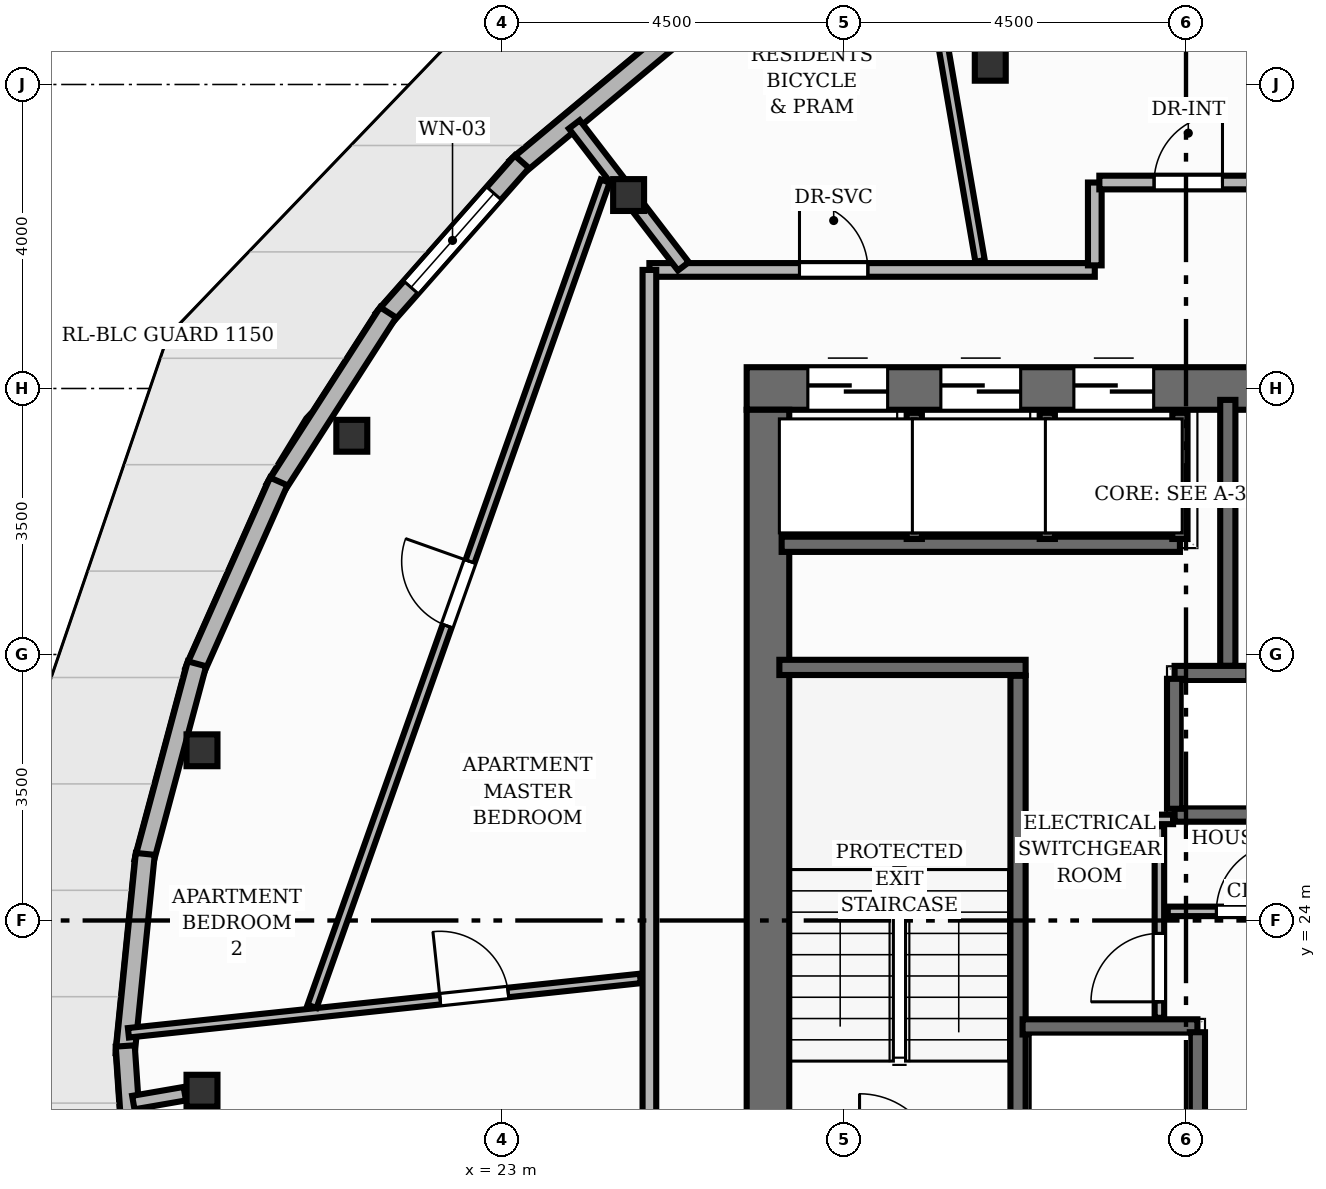
"""IFC4 building model, lengths in metres.
Left out: names, types, materials, properties, quantities, classifications, styles, units other than length and angle.
Written with IfcOpenShell. Run it as: python <this file> out.ifc"""

import sys

from ifc_helpers import new_model, si_unit, direction, frame, frame_2d, origin, origin_2d, place, context, subcontext, project, spatial, rectangle, i_section, extrude, element, fill, save


model = new_model("IFC4")
c1 = context("Model", 3, precision=1e-05, world=origin(), true_north=direction((0.0, 1.0)))
c2 = subcontext(c1, "Body", "Model", "MODEL_VIEW")
j1 = project(units=[si_unit("LENGTHUNIT", "METRE"), si_unit("PLANEANGLEUNIT", "RADIAN")], contexts=[c1])
p1 = place(None, origin())
s1 = spatial("IfcSite", under=j1, at=p1, CompositionType="ELEMENT")
p2 = place(p1, origin())
s2 = spatial("IfcBuilding", under=s1, at=p2, CompositionType="ELEMENT")
p3 = place(p2, frame((0.0, 0.0, 211.04)))
s3 = spatial("IfcBuildingStorey", under=s2, at=p3, CompositionType="ELEMENT", Elevation=211.04)
p4 = place(p3, frame((26.22, 31.0, 0.0), z_axis=(0.0, 0.0, 1.0), x_axis=(1.0, 0.0, 0.0)))
e1 = element("IfcWall", 1, at=p4, inside=s3, PredefinedType="SHEAR", context=c2, shape_type="SweptSolid", body=[
    extrude(rectangle(XDim=11.56, YDim=0.56, at=frame_2d((5.78, 0.0))), origin(), (0.0, 0.0, 1.0), 3.2),
])
p5 = place(p4, frame((8.18, 0.0, 0.0)))
e2 = element("IfcOpeningElement", 2, at=p5, cuts=e1, PredefinedType="OPENING", context=c2, shape_type="SweptSolid", body=[
    extrude(rectangle(XDim=1.1, YDim=2.15, at=frame_2d((0.55, 1.075))), frame((0.0, 0.29, 0.0), z_axis=(0.0, -1.0, 0.0), x_axis=(1.0, 0.0, 0.0)), (0.0, 0.0, 1.0), 0.58),
])
p6 = place(p4, frame((0.805, 0.0, 0.0)))
e3 = element("IfcOpeningElement", 3, at=p6, cuts=e1, PredefinedType="OPENING", context=c2, shape_type="SweptSolid", body=[
    extrude(rectangle(XDim=1.05, YDim=2.15, at=frame_2d((0.525, 1.075))), frame((0.0, 0.29, 0.0), z_axis=(0.0, -1.0, 0.0), x_axis=(1.0, 0.0, 0.0)), (0.0, 0.0, 1.0), 0.58),
])
p7 = place(p4, frame((2.555, 0.0, 0.0)))
e4 = element("IfcOpeningElement", 4, at=p7, cuts=e1, PredefinedType="OPENING", context=c2, shape_type="SweptSolid", body=[
    extrude(rectangle(XDim=1.05, YDim=2.15, at=frame_2d((0.525, 1.075))), frame((0.0, 0.29, 0.0), z_axis=(0.0, -1.0, 0.0), x_axis=(1.0, 0.0, 0.0)), (0.0, 0.0, 1.0), 0.58),
])
p8 = place(p4, frame((4.305, 0.0, 0.0)))
e5 = element("IfcOpeningElement", 5, at=p8, cuts=e1, PredefinedType="OPENING", context=c2, shape_type="SweptSolid", body=[
    extrude(rectangle(XDim=1.05, YDim=2.15, at=frame_2d((0.525, 1.075))), frame((0.0, 0.29, 0.0), z_axis=(0.0, -1.0, 0.0), x_axis=(1.0, 0.0, 0.0)), (0.0, 0.0, 1.0), 0.58),
])
p9 = place(p3, frame((26.5, 17.28, 0.0), z_axis=(0.0, 0.0, 1.0), x_axis=(0.0, 1.0, 0.0)))
e6 = element("IfcWall", 6, at=p9, inside=s3, PredefinedType="SHEAR", context=c2, shape_type="SweptSolid", body=[
    extrude(rectangle(XDim=13.44, YDim=0.56, at=frame_2d((6.72, 0.0))), origin(), (0.0, 0.0, 1.0), 3.2),
])
for number, where, z_axis, x_axis in (
    (7, (29.425, 35.26, 0.0), (0.0, 0.0, 1.0), (1.0, 0.0, 0.0)),
    (8, (24.667, 33.545, 0.0), (0.0, 0.0, 1.0), (1.0, 0.0, 0.0)),
    (9, (21.025, 30.378, 0.0), (0.0, 0.0, 1.0), (1.0, 0.0, 0.0)),
    (10, (19.054, 26.24, 0.0), (0.0, 0.0, 1.0), (1.0, 0.0, 0.0)),
    (11, (19.054, 21.76, 0.0), (0.0, 0.0, 1.0), (1.0, 0.0, 0.0)),
):
    element("IfcColumn", number, at=place(p3, frame(where, z_axis=z_axis, x_axis=x_axis)), inside=s3, PredefinedType="COLUMN", context=c2, shape_type="SweptSolid", body=[
        extrude(i_section(OverallWidth=0.407, OverallDepth=0.419, WebThickness=0.031, FlangeThickness=0.049, at=origin_2d()), origin(), (0.0, 0.0, 1.0), 3.2),
    ])
p10 = place(p3, frame((23.184, 33.906, 0.0), z_axis=(0.0, 0.0, 1.0), x_axis=(0.76821397209, 0.640193168571, 0.0)))
e12 = element("IfcWall", 12, at=p10, inside=s3, PredefinedType="SOLIDWALL", context=c2, shape_type="SweptSolid", body=[
    extrude(rectangle(XDim=2.739, YDim=0.25, at=frame_2d((1.369, 0.0))), origin(), (0.0, 0.0, 1.0), 2.96),
])
p11 = place(p3, frame((21.437, 31.915, 0.0), z_axis=(0.0, 0.0, 1.0), x_axis=(0.661694827408, 0.749773269317, 0.0)))
e13 = element("IfcWall", 13, at=p11, inside=s3, PredefinedType="SOLIDWALL", context=c2, shape_type="SweptSolid", body=[
    extrude(rectangle(XDim=2.758, YDim=0.25, at=frame_2d((1.379, 0.0))), origin(), (0.0, 0.0, 1.0), 2.96),
])
p12 = place(p11, frame((0.554, 0.0, 0.85)))
e14 = element("IfcOpeningElement", 14, at=p12, cuts=e13, PredefinedType="OPENING", context=c2, shape_type="SweptSolid", body=[
    extrude(rectangle(XDim=1.65, YDim=1.55, at=frame_2d((0.825, 0.775))), frame((0.0, 0.135, 0.0), z_axis=(0.0, -1.0, 0.0), x_axis=(1.0, 0.0, 0.0)), (0.0, 0.0, 1.0), 0.27),
])
p13 = place(p3, frame((20.012, 29.681, 0.0), z_axis=(0.0, 0.0, 1.0), x_axis=(0.540690479286, 0.841221615039, 0.0)))
e15 = element("IfcWall", 15, at=p13, inside=s3, PredefinedType="SOLIDWALL", context=c2, shape_type="SweptSolid", body=[
    extrude(rectangle(XDim=2.758, YDim=0.25, at=frame_2d((1.379, 0.0))), origin(), (0.0, 0.0, 1.0), 2.96),
])
p14 = place(p3, frame((18.951, 27.274, 0.0), z_axis=(0.0, 0.0, 1.0), x_axis=(0.40624599189, 0.913763751783, 0.0)))
e16 = element("IfcWall", 16, at=p14, inside=s3, PredefinedType="SOLIDWALL", context=c2, shape_type="SweptSolid", body=[
    extrude(rectangle(XDim=2.739, YDim=0.25, at=frame_2d((1.369, 0.0))), origin(), (0.0, 0.0, 1.0), 2.96),
])
p15 = place(p3, frame((18.288, 24.768, 0.0), z_axis=(0.0, 0.0, 1.0), x_axis=(0.259023691836, 0.965870968126, 0.0)))
e17 = element("IfcWall", 17, at=p15, inside=s3, PredefinedType="SOLIDWALL", context=c2, shape_type="SweptSolid", body=[
    extrude(rectangle(XDim=2.701, YDim=0.25, at=frame_2d((1.351, 0.0))), origin(), (0.0, 0.0, 1.0), 2.577),
])
p16 = place(p3, frame((18.042, 22.239, 0.0), z_axis=(0.0, 0.0, 1.0), x_axis=(0.100196668354, 0.99496765156, 0.0)))
e18 = element("IfcWall", 18, at=p16, inside=s3, PredefinedType="SOLIDWALL", context=c2, shape_type="SweptSolid", body=[
    extrude(rectangle(XDim=2.651, YDim=0.25, at=frame_2d((1.326, 0.0))), origin(), (0.0, 0.0, 1.0), 2.96),
])
p17 = place(p3, frame((18.221, 19.763, 0.0), z_axis=(0.0, 0.0, 1.0), x_axis=(-0.068469168344, 0.997653232835, 0.0)))
e19 = element("IfcWall", 19, at=p17, inside=s3, PredefinedType="SOLIDWALL", context=c2, shape_type="SweptSolid", body=[
    extrude(rectangle(XDim=2.592, YDim=0.25, at=frame_2d((1.296, 0.0))), origin(), (0.0, 0.0, 1.0), 2.96),
])
p18 = place(p3, frame((29.79, 20.78, 0.0), z_axis=(0.0, 0.0, 1.0), x_axis=(0.0, 1.0, 0.0)))
e20 = element("IfcWall", 20, at=p18, inside=s3, PredefinedType="SHEAR", context=c2, shape_type="SweptSolid", body=[
    extrude(rectangle(XDim=6.44, YDim=0.2, at=frame_2d((3.22, 0.0))), origin(), (0.0, 0.0, 1.0), 3.2),
])
p19 = place(p3, frame((26.65, 27.33, 0.0), z_axis=(0.0, 0.0, 1.0), x_axis=(1.0, 0.0, 0.0)))
e21 = element("IfcWall", 21, at=p19, inside=s3, PredefinedType="SHEAR", context=c2, shape_type="SweptSolid", body=[
    extrude(rectangle(XDim=3.24, YDim=0.2, at=frame_2d((1.62, 0.0))), origin(), (0.0, 0.0, 1.0), 3.2),
])
p20 = place(p3, frame((32.55, 27.35, 0.0), z_axis=(0.0, 0.0, 1.0), x_axis=(0.0, 1.0, 0.0)))
e22 = element("IfcWall", 22, at=p20, inside=s3, PredefinedType="SHEAR", context=c2, shape_type="SweptSolid", body=[
    extrude(rectangle(XDim=3.5, YDim=0.2, at=frame_2d((1.75, 0.0))), origin(), (0.0, 0.0, 1.0), 3.2),
])
p21 = place(p3, frame((29.85, 22.6, 0.0), z_axis=(0.0, 0.0, 1.0), x_axis=(1.0, 0.0, 0.0)))
e23 = element("IfcWall", 23, at=p21, inside=s3, PredefinedType="SHEAR", context=c2, shape_type="SweptSolid", body=[
    extrude(rectangle(XDim=2.3, YDim=0.2, at=frame_2d((1.15, 0.0))), origin(), (0.0, 0.0, 1.0), 3.2),
])
p22 = place(p3, frame((32.15, 20.82, 0.0), z_axis=(0.0, 0.0, 1.0), x_axis=(0.0, 1.0, 0.0)))
e24 = element("IfcWall", 24, at=p22, inside=s3, PredefinedType="SHEAR", context=c2, shape_type="SweptSolid", body=[
    extrude(rectangle(XDim=1.71, YDim=0.2, at=frame_2d((0.855, 0.0))), origin(), (0.0, 0.0, 1.0), 3.2),
])
p23 = place(p3, frame((31.85, 27.25, 0.0), z_axis=(0.0, 0.0, 1.0), x_axis=(1.0, 0.0, 0.0)))
e25 = element("IfcWall", 25, at=p23, inside=s3, PredefinedType="SHEAR", context=c2, shape_type="SweptSolid", body=[
    extrude(rectangle(XDim=2.3, YDim=0.2, at=frame_2d((1.15, 0.0))), origin(), (0.0, 0.0, 1.0), 3.2),
])
p24 = place(p23, frame((0.95, 0.0, 0.0)))
e26 = element("IfcOpeningElement", 26, at=p24, cuts=e25, PredefinedType="OPENING", context=c2, shape_type="SweptSolid", body=[
    extrude(rectangle(XDim=1.1, YDim=2.15, at=frame_2d((0.55, 1.075))), frame((0.0, 0.11, 0.0), z_axis=(0.0, -1.0, 0.0), x_axis=(1.0, 0.0, 0.0)), (0.0, 0.0, 1.0), 0.22),
])
p25 = place(p3, frame((31.85, 25.4, 0.0), z_axis=(0.0, 0.0, 1.0), x_axis=(1.0, 0.0, 0.0)))
e27 = element("IfcWall", 27, at=p25, inside=s3, PredefinedType="SHEAR", context=c2, shape_type="SweptSolid", body=[
    extrude(rectangle(XDim=2.3, YDim=0.2, at=frame_2d((1.15, 0.0))), origin(), (0.0, 0.0, 1.0), 3.2),
])
p26 = place(p3, frame((31.85, 25.47, 0.0), z_axis=(0.0, 0.0, 1.0), x_axis=(0.0, 1.0, 0.0)))
e28 = element("IfcWall", 28, at=p26, inside=s3, PredefinedType="SHEAR", context=c2, shape_type="SweptSolid", body=[
    extrude(rectangle(XDim=1.71, YDim=0.2, at=frame_2d((0.855, 0.0))), origin(), (0.0, 0.0, 1.0), 3.2),
])
p27 = place(p3, frame((26.68, 28.95, 0.0), z_axis=(0.0, 0.0, 1.0), x_axis=(1.0, 0.0, 0.0)))
e29 = element("IfcWall", 29, at=p27, inside=s3, PredefinedType="SHEAR", context=c2, shape_type="SweptSolid", body=[
    extrude(rectangle(XDim=5.24, YDim=0.2, at=frame_2d((2.62, 0.0))), origin(), (0.0, 0.0, 1.0), 3.2),
])
for number, where, z_axis, x_axis in (
    (30, (31.92, 29.02, 0.0), (0.0, 0.0, 1.0), (0.0, 1.0, 0.0)),
    (31, (28.425, 29.02, 0.0), (0.0, 0.0, 1.0), (0.0, 1.0, 0.0)),
    (32, (30.175, 29.02, 0.0), (0.0, 0.0, 1.0), (0.0, 1.0, 0.0)),
):
    element("IfcWall", number, at=place(p3, frame(where, z_axis=z_axis, x_axis=x_axis)), inside=s3, PredefinedType="SHEAR", context=c2, shape_type="SweptSolid", body=[
        extrude(rectangle(XDim=1.66, YDim=0.2, at=frame_2d((0.83, 0.0))), origin(), (0.0, 0.0, 1.0), 3.2),
    ])
p28 = place(p3, frame((31.65, 22.72, 0.0), z_axis=(0.0, 0.0, 1.0), x_axis=(0.0, 1.0, 0.0)))
e33 = element("IfcWall", 33, at=p28, inside=s3, PredefinedType="PARTITIONING", context=c2, shape_type="SweptSolid", body=[
    extrude(rectangle(XDim=2.52, YDim=0.125, at=frame_2d((1.26, 0.0))), origin(), (0.0, 0.0, 1.0), 2.955),
])
p29 = place(p28, frame((0.21, 0.0, 0.0)))
e34 = element("IfcOpeningElement", 34, at=p29, cuts=e33, PredefinedType="OPENING", context=c2, shape_type="SweptSolid", body=[
    extrude(rectangle(XDim=0.9, YDim=2.1, at=frame_2d((0.45, 1.05))), frame((0.0, 0.073, 0.0), z_axis=(0.0, -1.0, 0.0), x_axis=(1.0, 0.0, 0.0)), (0.0, 0.0, 1.0), 0.145),
])
p30 = place(p3, frame((31.76, 24.12, 0.0), z_axis=(0.0, 0.0, 1.0), x_axis=(1.0, 0.0, 0.0)))
e35 = element("IfcWall", 35, at=p30, inside=s3, PredefinedType="PARTITIONING", context=c2, shape_type="SweptSolid", body=[
    extrude(rectangle(XDim=2.32, YDim=0.125, at=frame_2d((1.16, 0.0))), origin(), (0.0, 0.0, 1.0), 2.955),
])
p31 = place(p30, frame((0.64, 0.0, 0.0)))
e36 = element("IfcOpeningElement", 36, at=p31, cuts=e35, PredefinedType="OPENING", context=c2, shape_type="SweptSolid", body=[
    extrude(rectangle(XDim=0.9, YDim=2.1, at=frame_2d((0.45, 1.05))), frame((0.0, 0.073, 0.0), z_axis=(0.0, -1.0, 0.0), x_axis=(1.0, 0.0, 0.0)), (0.0, 0.0, 1.0), 0.145),
])
p32 = place(p3, frame((29.89, 25.33, 0.0), z_axis=(0.0, 0.0, 1.0), x_axis=(1.0, 0.0, 0.0)))
e37 = element("IfcWall", 37, at=p32, inside=s3, PredefinedType="PARTITIONING", context=c2, shape_type="SweptSolid", body=[
    extrude(rectangle(XDim=1.94, YDim=0.125, at=frame_2d((0.97, 0.0))), origin(), (0.0, 0.0, 1.0), 2.955),
])
p33 = place(p3, frame((24.527, 33.727, 0.0), z_axis=(0.0, 0.0, 1.0), x_axis=(-0.60903478373, 0.793143512995, 0.0)))
e38 = element("IfcWall", 38, at=p33, inside=s3, PredefinedType="PARTITIONING", context=c2, shape_type="SweptSolid", body=[
    extrude(rectangle(XDim=0.943, YDim=0.18, at=frame_2d((0.471, 0.0))), origin(), (0.0, 0.0, 1.0), 2.403),
])
p34 = place(p3, frame((18.827, 21.721, 0.0), z_axis=(0.0, 0.0, 1.0), x_axis=(-0.985357392461, -0.170501639647, 0.0)))
e39 = element("IfcWall", 39, at=p34, inside=s3, PredefinedType="PARTITIONING", context=c2, shape_type="SweptSolid", body=[
    extrude(rectangle(XDim=0.687, YDim=0.18, at=frame_2d((0.344, 0.0))), origin(), (0.0, 0.0, 1.0), 2.403),
])
p35 = place(p3, frame((24.94, 32.56, 0.0), z_axis=(0.0, 0.0, 1.0), x_axis=(1.0, 0.0, 0.0)))
e40 = element("IfcWall", 40, at=p35, inside=s3, PredefinedType="PARTITIONING", context=c2, shape_type="SweptSolid", body=[
    extrude(rectangle(XDim=5.86, YDim=0.18, at=frame_2d((2.93, 0.0))), origin(), (0.0, 0.0, 1.0), 2.955),
])
p36 = place(p35, frame((1.975, 0.0, 0.0)))
e41 = element("IfcOpeningElement", 41, at=p36, cuts=e40, PredefinedType="OPENING", context=c2, shape_type="SweptSolid", body=[
    extrude(rectangle(XDim=0.9, YDim=2.1, at=frame_2d((0.45, 1.05))), frame((0.0, 0.1, 0.0), z_axis=(0.0, -1.0, 0.0), x_axis=(1.0, 0.0, 0.0)), (0.0, 0.0, 1.0), 0.2),
])
p37 = place(p3, frame((30.8, 32.62, 0.0), z_axis=(0.0, 0.0, 1.0), x_axis=(0.0, 1.0, 0.0)))
e42 = element("IfcWall", 42, at=p37, inside=s3, PredefinedType="PARTITIONING", context=c2, shape_type="SweptSolid", body=[
    extrude(rectangle(XDim=1.09, YDim=0.18, at=frame_2d((0.545, 0.0))), origin(), (0.0, 0.0, 1.0), 2.955),
])
p38 = place(p3, frame((30.86, 33.71, 0.0), z_axis=(0.0, 0.0, 1.0), x_axis=(1.0, 0.0, 0.0)))
e43 = element("IfcWall", 43, at=p38, inside=s3, PredefinedType="PARTITIONING", context=c2, shape_type="SweptSolid", body=[
    extrude(rectangle(XDim=2.34, YDim=0.18, at=frame_2d((1.17, 0.0))), origin(), (0.0, 0.0, 1.0), 2.955),
])
p39 = place(p38, frame((0.72, 0.0, 0.0)))
e44 = element("IfcOpeningElement", 44, at=p39, cuts=e43, PredefinedType="OPENING", context=c2, shape_type="SweptSolid", body=[
    extrude(rectangle(XDim=0.9, YDim=2.1, at=frame_2d((0.45, 1.05))), frame((0.0, 0.1, 0.0), z_axis=(0.0, -1.0, 0.0), x_axis=(1.0, 0.0, 0.0)), (0.0, 0.0, 1.0), 0.2),
])
p40 = place(p3, frame((24.94, 15.44, 0.0), z_axis=(0.0, 0.0, 1.0), x_axis=(0.0, 1.0, 0.0)))
e45 = element("IfcWall", 45, at=p40, inside=s3, PredefinedType="PARTITIONING", context=c2, shape_type="SweptSolid", body=[
    extrude(rectangle(XDim=17.12, YDim=0.18, at=frame_2d((8.56, 0.0))), origin(), (0.0, 0.0, 1.0), 2.955),
])
p41 = place(p40, frame((4.404, 0.0, 0.0)))
e46 = element("IfcOpeningElement", 46, at=p41, cuts=e45, PredefinedType="OPENING", context=c2, shape_type="SweptSolid", body=[
    extrude(rectangle(XDim=1.05, YDim=2.15, at=frame_2d((0.525, 1.075))), frame((0.0, 0.1, 0.0), z_axis=(0.0, -1.0, 0.0), x_axis=(1.0, 0.0, 0.0)), (0.0, 0.0, 1.0), 0.2),
])
p42 = place(p3, frame((28.49, 37.341, 0.0), z_axis=(0.0, 0.0, 1.0), x_axis=(0.169376334169, -0.98555144839, 0.0)))
e47 = element("IfcWall", 47, at=p42, inside=s3, PredefinedType="PARTITIONING", context=c2, shape_type="SweptSolid", body=[
    extrude(rectangle(XDim=4.731, YDim=0.125, at=frame_2d((2.365, 0.0))), origin(), (0.0, 0.0, 1.0), 2.955),
])
p43 = place(p3, frame((25.387, 32.608, 0.0), z_axis=(0.0, 0.0, 1.0), x_axis=(-0.609302225724, 0.792938079378, 0.0)))
e48 = element("IfcWall", 48, at=p43, inside=s3, PredefinedType="PARTITIONING", context=c2, shape_type="SweptSolid", body=[
    extrude(rectangle(XDim=0.953, YDim=0.18, at=frame_2d((0.477, 0.0))), origin(), (0.0, 0.0, 1.0), 2.403),
])
p44 = place(p3, frame((18.086, 22.522, 0.0), z_axis=(0.0, 0.0, 1.0), x_axis=(0.994410835851, 0.105579778091, 0.0)))
e49 = element("IfcWall", 49, at=p44, inside=s3, PredefinedType="PARTITIONING", context=c2, shape_type="SweptSolid", body=[
    extrude(rectangle(XDim=6.773, YDim=0.125, at=frame_2d((3.386, 0.0))), origin(), (0.0, 0.0, 1.0), 2.955),
])
p45 = place(p44, frame((4.124, 0.0, 0.0)))
e50 = element("IfcOpeningElement", 50, at=p45, cuts=e49, PredefinedType="OPENING", context=c2, shape_type="SweptSolid", body=[
    extrude(rectangle(XDim=0.9, YDim=2.1, at=frame_2d((0.45, 1.05))), frame((0.0, 0.073, 0.0), z_axis=(0.0, -1.0, 0.0), x_axis=(1.0, 0.0, 0.0)), (0.0, 0.0, 1.0), 0.145),
])
p46 = place(p3, frame((20.501, 22.87, 0.0), z_axis=(0.0, 0.0, 1.0), x_axis=(0.334686593727, 0.942329498625, 0.0)))
e51 = element("IfcWall", 51, at=p46, inside=s3, PredefinedType="PARTITIONING", context=c2, shape_type="SweptSolid", body=[
    extrude(rectangle(XDim=11.525, YDim=0.125, at=frame_2d((5.762, 0.0))), origin(), (0.0, 0.0, 1.0), 2.488),
])
p47 = place(p46, frame((5.312, 0.0, 0.0)))
e52 = element("IfcOpeningElement", 52, at=p47, cuts=e51, PredefinedType="OPENING", context=c2, shape_type="SweptSolid", body=[
    extrude(rectangle(XDim=0.9, YDim=2.1, at=frame_2d((0.45, 1.05))), frame((0.0, 0.073, 0.0), z_axis=(0.0, -1.0, 0.0), x_axis=(1.0, 0.0, 0.0)), (0.0, 0.0, 1.0), 0.145),
])
p48 = place(p12, origin())
e53 = element("IfcWindow", 53, at=p48, inside=s3, PartitioningType="SINGLE_PANEL", PredefinedType="WINDOW", context=c2, shape_type="SweptSolid", body=[
    extrude(rectangle(XDim=1.65, YDim=1.55, at=frame_2d((0.825, 0.775))), frame((0.0, 0.03, 0.0), z_axis=(0.0, -1.0, 0.0), x_axis=(1.0, 0.0, 0.0)), (0.0, 0.0, 1.0), 0.06),
])
fill(e14, e53)
p49 = place(p6, origin())
e54 = element("IfcDoor", 54, at=p49, inside=s3, OperationType="DOUBLE_DOOR_SLIDING", PredefinedType="DOOR", context=c2, shape_type="SweptSolid", body=[
    extrude(rectangle(XDim=1.05, YDim=2.15, at=frame_2d((0.525, 1.075))), frame((0.0, 0.025, 0.0), z_axis=(0.0, -1.0, 0.0), x_axis=(1.0, 0.0, 0.0)), (0.0, 0.0, 1.0), 0.05),
])
fill(e3, e54)
p50 = place(p7, origin())
e55 = element("IfcDoor", 55, at=p50, inside=s3, OperationType="DOUBLE_DOOR_SLIDING", PredefinedType="DOOR", context=c2, shape_type="SweptSolid", body=[
    extrude(rectangle(XDim=1.05, YDim=2.15, at=frame_2d((0.525, 1.075))), frame((0.0, 0.025, 0.0), z_axis=(0.0, -1.0, 0.0), x_axis=(1.0, 0.0, 0.0)), (0.0, 0.0, 1.0), 0.05),
])
fill(e4, e55)
p51 = place(p8, origin())
e56 = element("IfcDoor", 56, at=p51, inside=s3, OperationType="DOUBLE_DOOR_SLIDING", PredefinedType="DOOR", context=c2, shape_type="SweptSolid", body=[
    extrude(rectangle(XDim=1.05, YDim=2.15, at=frame_2d((0.525, 1.075))), frame((0.0, 0.025, 0.0), z_axis=(0.0, -1.0, 0.0), x_axis=(1.0, 0.0, 0.0)), (0.0, 0.0, 1.0), 0.05),
])
fill(e5, e56)
p52 = place(p29, origin())
e57 = element("IfcDoor", 57, at=p52, inside=s3, OperationType="SINGLE_SWING_LEFT", PredefinedType="DOOR", context=c2, shape_type="SweptSolid", body=[
    extrude(rectangle(XDim=0.9, YDim=2.1, at=frame_2d((0.45, 1.05))), frame((0.0, 0.025, 0.0), z_axis=(0.0, -1.0, 0.0), x_axis=(1.0, 0.0, 0.0)), (0.0, 0.0, 1.0), 0.05),
])
fill(e34, e57)
p53 = place(p31, origin())
e58 = element("IfcDoor", 58, at=p53, inside=s3, OperationType="SINGLE_SWING_RIGHT", PredefinedType="DOOR", context=c2, shape_type="SweptSolid", body=[
    extrude(rectangle(XDim=0.9, YDim=2.1, at=frame_2d((0.45, 1.05))), frame((0.0, 0.025, 0.0), z_axis=(0.0, -1.0, 0.0), x_axis=(1.0, 0.0, 0.0)), (0.0, 0.0, 1.0), 0.05),
])
fill(e36, e58)
p54 = place(p36, origin())
e59 = element("IfcDoor", 59, at=p54, inside=s3, OperationType="SINGLE_SWING_LEFT", PredefinedType="DOOR", context=c2, shape_type="SweptSolid", body=[
    extrude(rectangle(XDim=0.9, YDim=2.1, at=frame_2d((0.45, 1.05))), frame((0.0, 0.025, 0.0), z_axis=(0.0, -1.0, 0.0), x_axis=(1.0, 0.0, 0.0)), (0.0, 0.0, 1.0), 0.05),
])
fill(e41, e59)
p55 = place(p39, origin())
e60 = element("IfcDoor", 60, at=p55, inside=s3, OperationType="SINGLE_SWING_RIGHT", PredefinedType="DOOR", context=c2, shape_type="SweptSolid", body=[
    extrude(rectangle(XDim=0.9, YDim=2.1, at=frame_2d((0.45, 1.05))), frame((0.0, 0.025, 0.0), z_axis=(0.0, -1.0, 0.0), x_axis=(1.0, 0.0, 0.0)), (0.0, 0.0, 1.0), 0.05),
])
fill(e44, e60)
p56 = place(p45, origin())
e61 = element("IfcDoor", 61, at=p56, inside=s3, OperationType="SINGLE_SWING_LEFT", PredefinedType="DOOR", context=c2, shape_type="SweptSolid", body=[
    extrude(rectangle(XDim=0.9, YDim=2.1, at=frame_2d((0.45, 1.05))), frame((0.0, 0.025, 0.0), z_axis=(0.0, -1.0, 0.0), x_axis=(1.0, 0.0, 0.0)), (0.0, 0.0, 1.0), 0.05),
])
fill(e50, e61)
p57 = place(p47, origin())
e62 = element("IfcDoor", 62, at=p57, inside=s3, OperationType="SINGLE_SWING_RIGHT", PredefinedType="DOOR", context=c2, shape_type="SweptSolid", body=[
    extrude(rectangle(XDim=0.9, YDim=2.1, at=frame_2d((0.45, 1.05))), frame((0.0, 0.025, 0.0), z_axis=(0.0, -1.0, 0.0), x_axis=(1.0, 0.0, 0.0)), (0.0, 0.0, 1.0), 0.05),
])
fill(e52, e62)
save(model, sys.argv[1])
